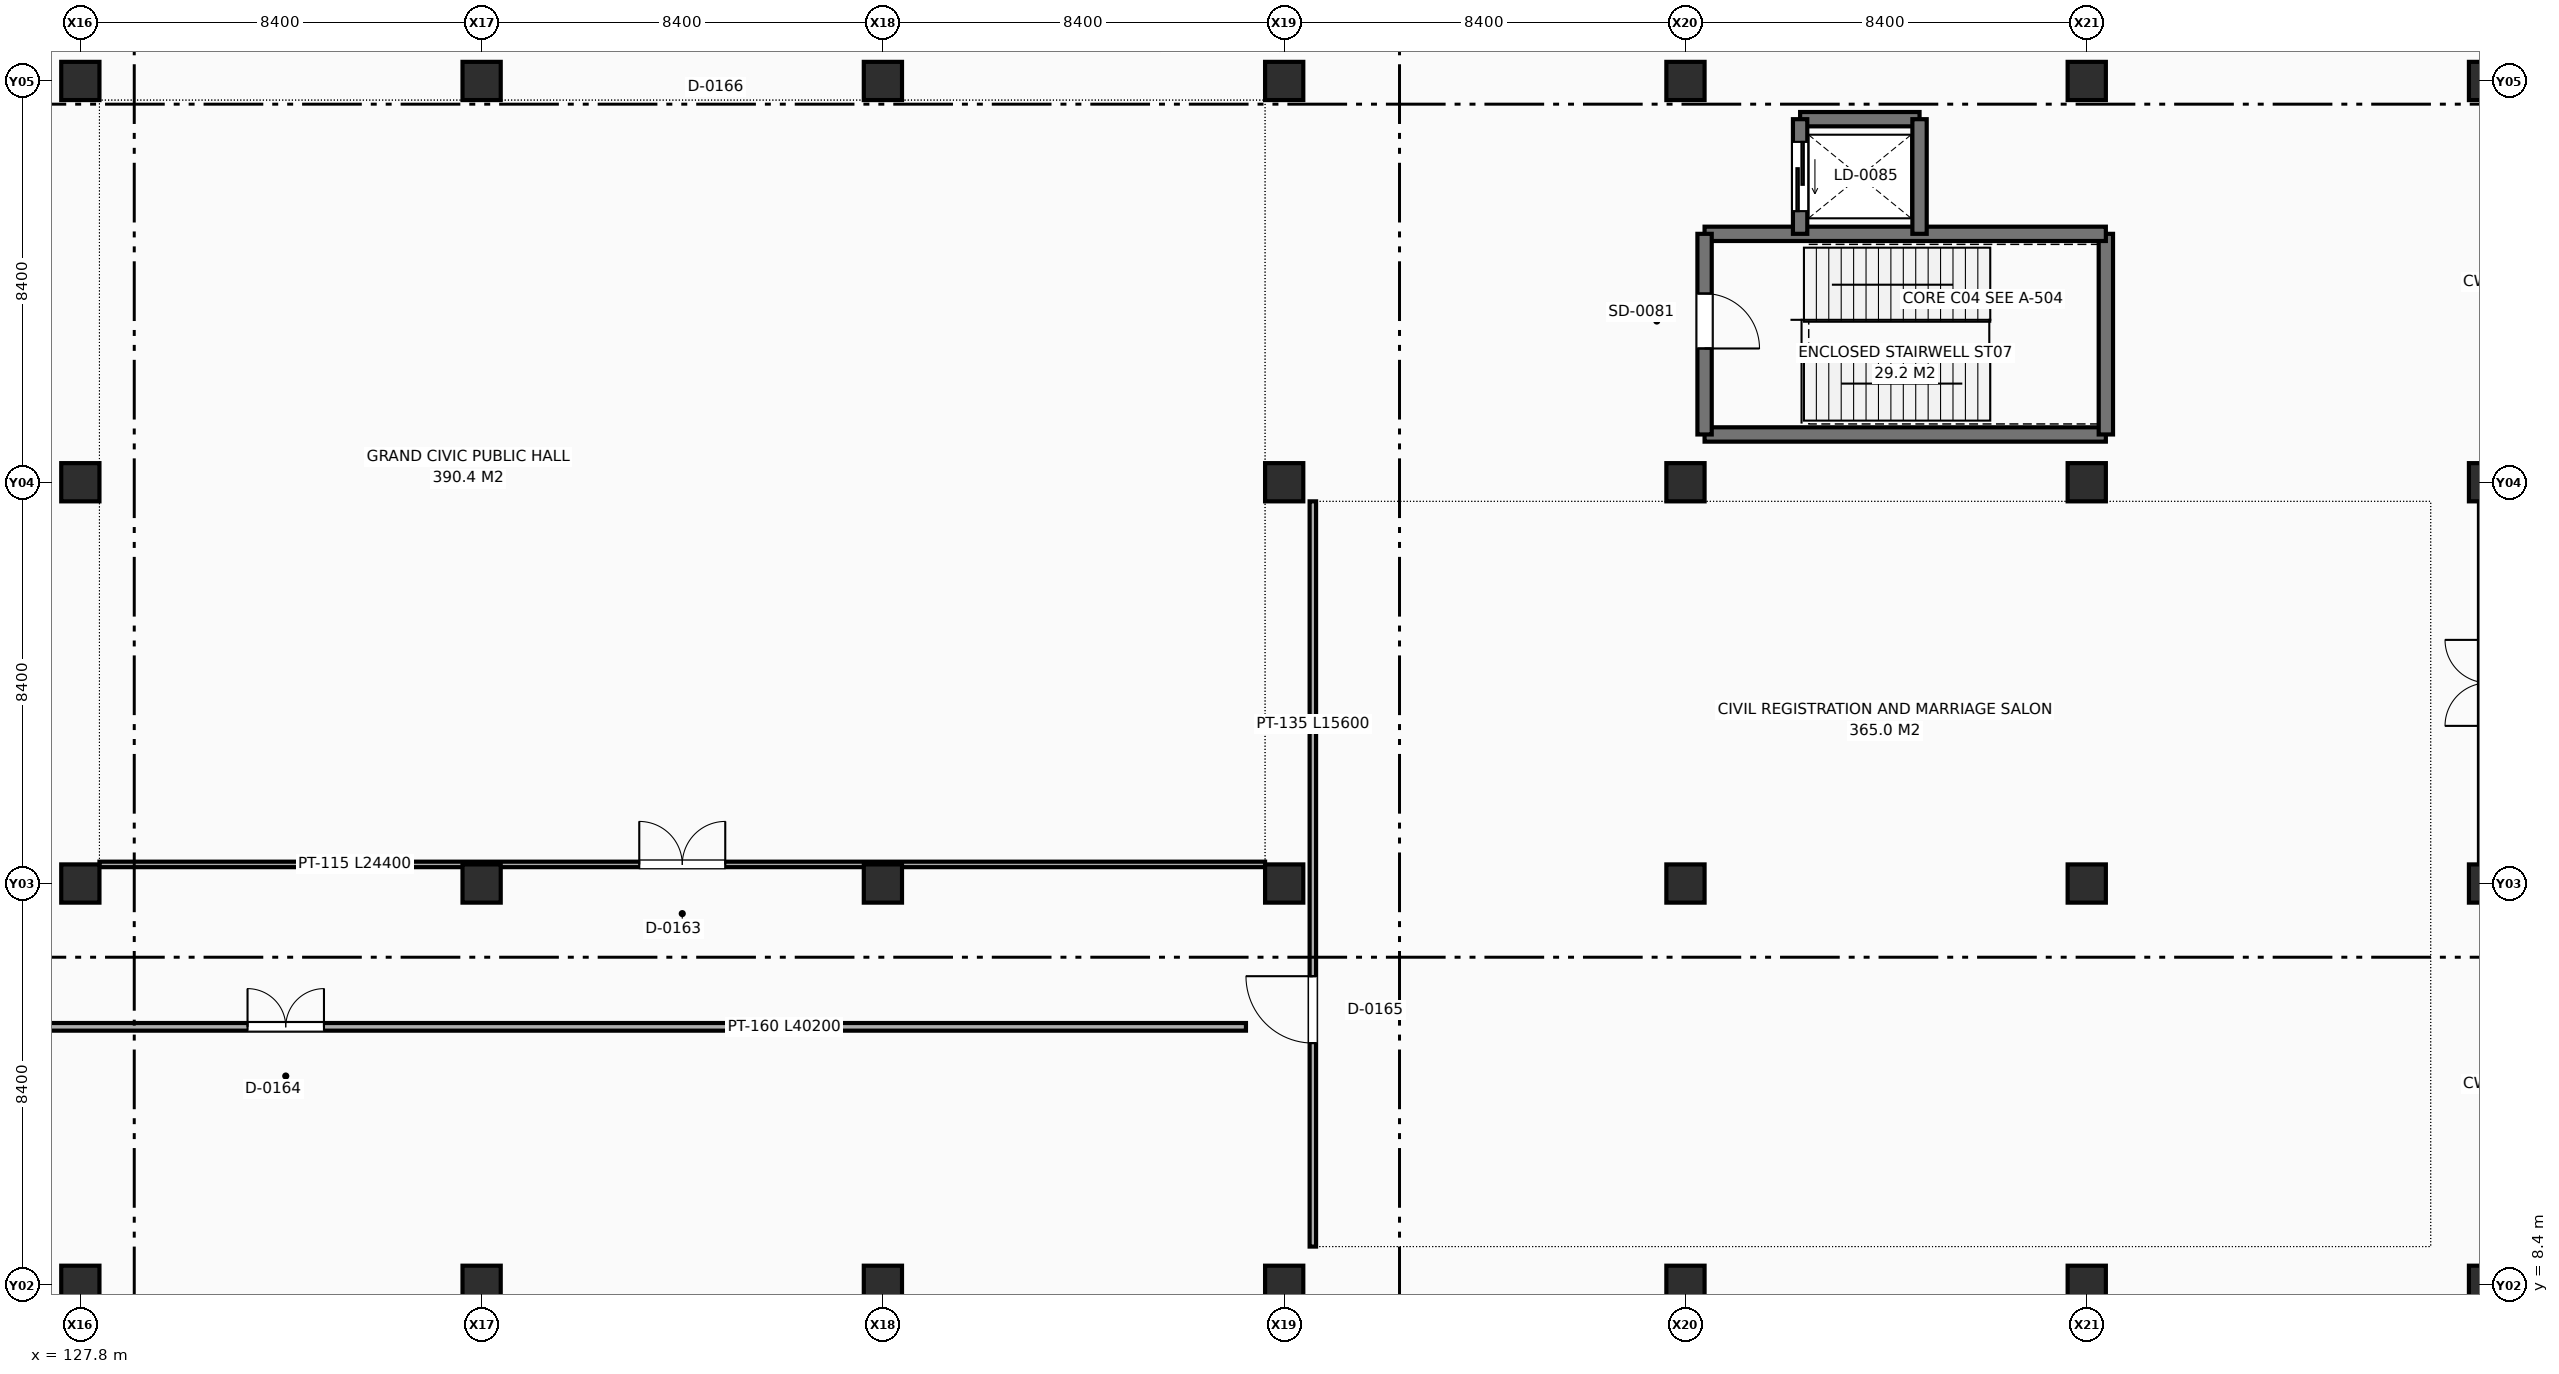
"""IFC4 building model, lengths in metres.
Left out: names, types, materials, properties, quantities, classifications, styles, units other than length and angle.
Written with IfcOpenShell. Run it as: python <this file> out.ifc"""

import sys

from ifc_helpers import new_model, si_unit, direction, frame, frame_2d, origin, origin_2d, place, context, subcontext, project, spatial, rectangle, extrude, element, fill, save


model = new_model("IFC4")
c1 = context("Model", 3, precision=1e-05, world=origin(), true_north=direction((0.0, 1.0)))
c2 = subcontext(c1, "Body", "Model", "MODEL_VIEW")
j1 = project(units=[si_unit("LENGTHUNIT", "METRE"), si_unit("PLANEANGLEUNIT", "RADIAN")], contexts=[c1])
p1 = place(None, origin())
s1 = spatial("IfcSite", under=j1, at=p1, CompositionType="ELEMENT")
p2 = place(p1, origin())
s2 = spatial("IfcBuilding", under=s1, at=p2, CompositionType="ELEMENT")
p3 = place(p2, origin())
s3 = spatial("IfcBuildingStorey", under=s2, at=p3, CompositionType="ELEMENT", Elevation=0.0)
for number, where, z_axis, x_axis in (
    (1, (127.8, 8.4, 0.0), (0.0, 0.0, 1.0), (1.0, 0.0, 0.0)),
    (2, (127.8, 16.8, 0.0), (0.0, 0.0, 1.0), (1.0, 0.0, 0.0)),
    (3, (127.8, 25.2, 0.0), (0.0, 0.0, 1.0), (1.0, 0.0, 0.0)),
    (4, (127.8, 33.6, 0.0), (0.0, 0.0, 1.0), (1.0, 0.0, 0.0)),
    (5, (136.2, 8.4, 0.0), (0.0, 0.0, 1.0), (1.0, 0.0, 0.0)),
    (6, (136.2, 16.8, 0.0), (0.0, 0.0, 1.0), (1.0, 0.0, 0.0)),
    (7, (136.2, 33.6, 0.0), (0.0, 0.0, 1.0), (1.0, 0.0, 0.0)),
    (8, (144.6, 8.4, 0.0), (0.0, 0.0, 1.0), (1.0, 0.0, 0.0)),
    (9, (144.6, 16.8, 0.0), (0.0, 0.0, 1.0), (1.0, 0.0, 0.0)),
    (10, (144.6, 33.6, 0.0), (0.0, 0.0, 1.0), (1.0, 0.0, 0.0)),
    (11, (153.0, 8.4, 0.0), (0.0, 0.0, 1.0), (1.0, 0.0, 0.0)),
    (12, (153.0, 16.8, 0.0), (0.0, 0.0, 1.0), (1.0, 0.0, 0.0)),
    (13, (153.0, 25.2, 0.0), (0.0, 0.0, 1.0), (1.0, 0.0, 0.0)),
    (14, (153.0, 33.6, 0.0), (0.0, 0.0, 1.0), (1.0, 0.0, 0.0)),
    (15, (161.4, 8.4, 0.0), (0.0, 0.0, 1.0), (1.0, 0.0, 0.0)),
    (16, (161.4, 16.8, 0.0), (0.0, 0.0, 1.0), (1.0, 0.0, 0.0)),
    (17, (161.4, 25.2, 0.0), (0.0, 0.0, 1.0), (1.0, 0.0, 0.0)),
    (18, (161.4, 33.6, 0.0), (0.0, 0.0, 1.0), (1.0, 0.0, 0.0)),
    (19, (169.8, 8.4, 0.0), (0.0, 0.0, 1.0), (1.0, 0.0, 0.0)),
    (20, (169.8, 16.8, 0.0), (0.0, 0.0, 1.0), (1.0, 0.0, 0.0)),
    (21, (169.8, 25.2, 0.0), (0.0, 0.0, 1.0), (1.0, 0.0, 0.0)),
    (22, (169.8, 33.6, 0.0), (0.0, 0.0, 1.0), (1.0, 0.0, 0.0)),
    (23, (178.2, 8.4, 0.0), (0.0, 0.0, 1.0), (1.0, 0.0, 0.0)),
    (24, (178.2, 16.8, 0.0), (0.0, 0.0, 1.0), (1.0, 0.0, 0.0)),
    (25, (178.2, 25.2, 0.0), (0.0, 0.0, 1.0), (1.0, 0.0, 0.0)),
    (26, (178.2, 33.6, 0.0), (0.0, 0.0, 1.0), (1.0, 0.0, 0.0)),
):
    element("IfcColumn", number, at=place(p3, frame(where, z_axis=z_axis, x_axis=x_axis)), inside=s3, PredefinedType="COLUMN", context=c2, shape_type="SweptSolid", body=[
        extrude(rectangle(XDim=0.8, YDim=0.8, at=origin_2d()), origin(), (0.0, 0.0, 1.0), 5.4),
    ])
p4 = place(p3, frame((161.8, 26.2, 0.0), z_axis=(0.0, 0.0, 1.0), x_axis=(1.0, 0.0, 0.0)))
e27 = element("IfcWall", 27, at=p4, inside=s3, PredefinedType="SHEAR", context=c2, shape_type="SweptSolid", body=[
    extrude(rectangle(XDim=8.4, YDim=0.3, at=frame_2d((4.2, 0.0))), origin(), (0.0, 0.0, 1.0), 5.12),
])
p5 = place(p3, frame((170.2, 26.2, 0.0), z_axis=(0.0, 0.0, 1.0), x_axis=(0.0, 1.0, 0.0)))
e28 = element("IfcWall", 28, at=p5, inside=s3, PredefinedType="SHEAR", context=c2, shape_type="SweptSolid", body=[
    extrude(rectangle(XDim=4.2, YDim=0.3, at=frame_2d((2.1, 0.0))), origin(), (0.0, 0.0, 1.0), 5.12),
])
p6 = place(p3, frame((170.2, 30.4, 0.0), z_axis=(0.0, 0.0, 1.0), x_axis=(-1.0, 0.0, 0.0)))
e29 = element("IfcWall", 29, at=p6, inside=s3, PredefinedType="SHEAR", context=c2, shape_type="SweptSolid", body=[
    extrude(rectangle(XDim=8.4, YDim=0.3, at=frame_2d((4.2, 0.0))), origin(), (0.0, 0.0, 1.0), 5.12),
])
p7 = place(p3, frame((161.8, 30.4, 0.0), z_axis=(0.0, 0.0, 1.0), x_axis=(0.0, -1.0, 0.0)))
e30 = element("IfcWall", 30, at=p7, inside=s3, PredefinedType="SHEAR", context=c2, shape_type="SweptSolid", body=[
    extrude(rectangle(XDim=4.2, YDim=0.3, at=frame_2d((2.1, 0.0))), origin(), (0.0, 0.0, 1.0), 5.12),
])
p8 = place(p7, frame((1.25, 0.0, 0.0)))
e31 = element("IfcOpeningElement", 31, at=p8, cuts=e30, PredefinedType="OPENING", context=c2, shape_type="SweptSolid", body=[
    extrude(rectangle(XDim=1.15, YDim=2.2, at=frame_2d((0.575, 1.1))), frame((0.0, 0.16, 0.0), z_axis=(0.0, -1.0, 0.0), x_axis=(1.0, 0.0, 0.0)), (0.0, 0.0, 1.0), 0.32),
])
p9 = place(p3, frame((166.3, 32.8, 0.0), z_axis=(0.0, 0.0, 1.0), x_axis=(-1.0, 0.0, 0.0)))
e32 = element("IfcWall", 32, at=p9, inside=s3, PredefinedType="SHEAR", context=c2, shape_type="SweptSolid", body=[
    extrude(rectangle(XDim=2.5, YDim=0.3, at=frame_2d((1.25, 0.0))), origin(), (0.0, 0.0, 1.0), 5.12),
])
p10 = place(p3, frame((163.8, 32.8, 0.0), z_axis=(0.0, 0.0, 1.0), x_axis=(0.0, -1.0, 0.0)))
e33 = element("IfcWall", 33, at=p10, inside=s3, PredefinedType="SHEAR", context=c2, shape_type="SweptSolid", body=[
    extrude(rectangle(XDim=2.4, YDim=0.3, at=frame_2d((1.2, 0.0))), origin(), (0.0, 0.0, 1.0), 5.12),
])
p11 = place(p10, frame((0.475, 0.0, 0.0)))
e34 = element("IfcOpeningElement", 34, at=p11, cuts=e33, PredefinedType="OPENING", context=c2, shape_type="SweptSolid", body=[
    extrude(rectangle(XDim=1.45, YDim=2.35, at=frame_2d((0.725, 1.175))), frame((0.0, 0.16, 0.0), z_axis=(0.0, -1.0, 0.0), x_axis=(1.0, 0.0, 0.0)), (0.0, 0.0, 1.0), 0.32),
])
p12 = place(p3, frame((166.3, 30.4, 0.0), z_axis=(0.0, 0.0, 1.0), x_axis=(0.0, 1.0, 0.0)))
e35 = element("IfcWall", 35, at=p12, inside=s3, PredefinedType="SHEAR", context=c2, shape_type="SweptSolid", body=[
    extrude(rectangle(XDim=2.4, YDim=0.3, at=frame_2d((1.2, 0.0))), origin(), (0.0, 0.0, 1.0), 5.12),
])
p13 = place(p3, frame((128.2, 17.2, 0.0), z_axis=(0.0, 0.0, 1.0), x_axis=(1.0, 0.0, 0.0)))
e36 = element("IfcWall", 36, at=p13, inside=s3, PredefinedType="PARTITIONING", context=c2, shape_type="SweptSolid", body=[
    extrude(rectangle(XDim=24.4, YDim=0.115, at=frame_2d((12.2, 0.0))), origin(), (0.0, 0.0, 1.0), 4.15),
])
p14 = place(p13, frame((11.3, 0.0, 0.0)))
e37 = element("IfcOpeningElement", 37, at=p14, cuts=e36, PredefinedType="OPENING", context=c2, shape_type="SweptSolid", body=[
    extrude(rectangle(XDim=1.8, YDim=2.4, at=frame_2d((0.9, 1.2))), frame((0.0, 0.067, 0.0), z_axis=(0.0, -1.0, 0.0), x_axis=(1.0, 0.0, 0.0)), (0.0, 0.0, 1.0), 0.135),
])
p15 = place(p3, frame((112.0, 13.8, 0.0), z_axis=(0.0, 0.0, 1.0), x_axis=(1.0, 0.0, 0.0)))
e38 = element("IfcWall", 38, at=p15, inside=s3, PredefinedType="PARTITIONING", context=c2, shape_type="SweptSolid", body=[
    extrude(rectangle(XDim=40.2, YDim=0.16, at=frame_2d((20.1, 0.0))), origin(), (0.0, 0.0, 1.0), 4.844),
])
p16 = place(p15, frame((19.3, 0.0, 0.0)))
e39 = element("IfcOpeningElement", 39, at=p16, cuts=e38, PredefinedType="OPENING", context=c2, shape_type="SweptSolid", body=[
    extrude(rectangle(XDim=1.6, YDim=2.3, at=frame_2d((0.8, 1.15))), frame((0.0, 0.09, 0.0), z_axis=(0.0, -1.0, 0.0), x_axis=(1.0, 0.0, 0.0)), (0.0, 0.0, 1.0), 0.18),
])
p17 = place(p3, frame((153.6, 9.2, 0.0), z_axis=(0.0, 0.0, 1.0), x_axis=(0.0, 1.0, 0.0)))
e40 = element("IfcWall", 40, at=p17, inside=s3, PredefinedType="PARTITIONING", context=c2, shape_type="SweptSolid", body=[
    extrude(rectangle(XDim=15.6, YDim=0.135, at=frame_2d((7.8, 0.0))), origin(), (0.0, 0.0, 1.0), 5.06),
])
p18 = place(p17, frame((4.26, 0.0, 0.0)))
e41 = element("IfcOpeningElement", 41, at=p18, cuts=e40, PredefinedType="OPENING", context=c2, shape_type="SweptSolid", body=[
    extrude(rectangle(XDim=1.4, YDim=2.25, at=frame_2d((0.7, 1.125))), frame((0.0, 0.077, 0.0), z_axis=(0.0, -1.0, 0.0), x_axis=(1.0, 0.0, 0.0)), (0.0, 0.0, 1.0), 0.155),
])
p19 = place(p8, frame((1.15, 0.0, 0.0), z_axis=(0.0, 0.0, 1.0), x_axis=(-1.0, 0.0, 0.0)))
e42 = element("IfcDoor", 42, at=p19, inside=s3, OperationType="SINGLE_SWING_RIGHT", PredefinedType="DOOR", context=c2, shape_type="SweptSolid", body=[
    extrude(rectangle(XDim=1.15, YDim=2.2, at=frame_2d((0.575, 1.1))), frame((0.0, 0.025, 0.0), z_axis=(0.0, -1.0, 0.0), x_axis=(1.0, 0.0, 0.0)), (0.0, 0.0, 1.0), 0.05),
])
fill(e31, e42)
p20 = place(p11, origin())
e43 = element("IfcDoor", 43, at=p20, inside=s3, OperationType="SLIDING_TO_LEFT", PredefinedType="DOOR", context=c2, shape_type="SweptSolid", body=[
    extrude(rectangle(XDim=1.45, YDim=2.35, at=frame_2d((0.725, 1.175))), frame((0.0, 0.025, 0.0), z_axis=(0.0, -1.0, 0.0), x_axis=(1.0, 0.0, 0.0)), (0.0, 0.0, 1.0), 0.05),
])
fill(e34, e43)
p21 = place(p14, origin())
e44 = element("IfcDoor", 44, at=p21, inside=s3, OperationType="DOUBLE_DOOR_SINGLE_SWING", PredefinedType="DOOR", context=c2, shape_type="SweptSolid", body=[
    extrude(rectangle(XDim=1.8, YDim=2.4, at=frame_2d((0.9, 1.2))), frame((0.0, 0.025, 0.0), z_axis=(0.0, -1.0, 0.0), x_axis=(1.0, 0.0, 0.0)), (0.0, 0.0, 1.0), 0.05),
])
fill(e37, e44)
p22 = place(p16, origin())
e45 = element("IfcDoor", 45, at=p22, inside=s3, OperationType="DOUBLE_DOOR_SINGLE_SWING", PredefinedType="DOOR", context=c2, shape_type="SweptSolid", body=[
    extrude(rectangle(XDim=1.6, YDim=2.3, at=frame_2d((0.8, 1.15))), frame((0.0, 0.025, 0.0), z_axis=(0.0, -1.0, 0.0), x_axis=(1.0, 0.0, 0.0)), (0.0, 0.0, 1.0), 0.05),
])
fill(e39, e45)
p23 = place(p18, origin())
e46 = element("IfcDoor", 46, at=p23, inside=s3, OperationType="SINGLE_SWING_RIGHT", PredefinedType="DOOR", context=c2, shape_type="SweptSolid", body=[
    extrude(rectangle(XDim=1.4, YDim=2.25, at=frame_2d((0.7, 1.125))), frame((0.0, 0.025, 0.0), z_axis=(0.0, -1.0, 0.0), x_axis=(1.0, 0.0, 0.0)), (0.0, 0.0, 1.0), 0.05),
])
fill(e41, e46)
save(model, sys.argv[1])
